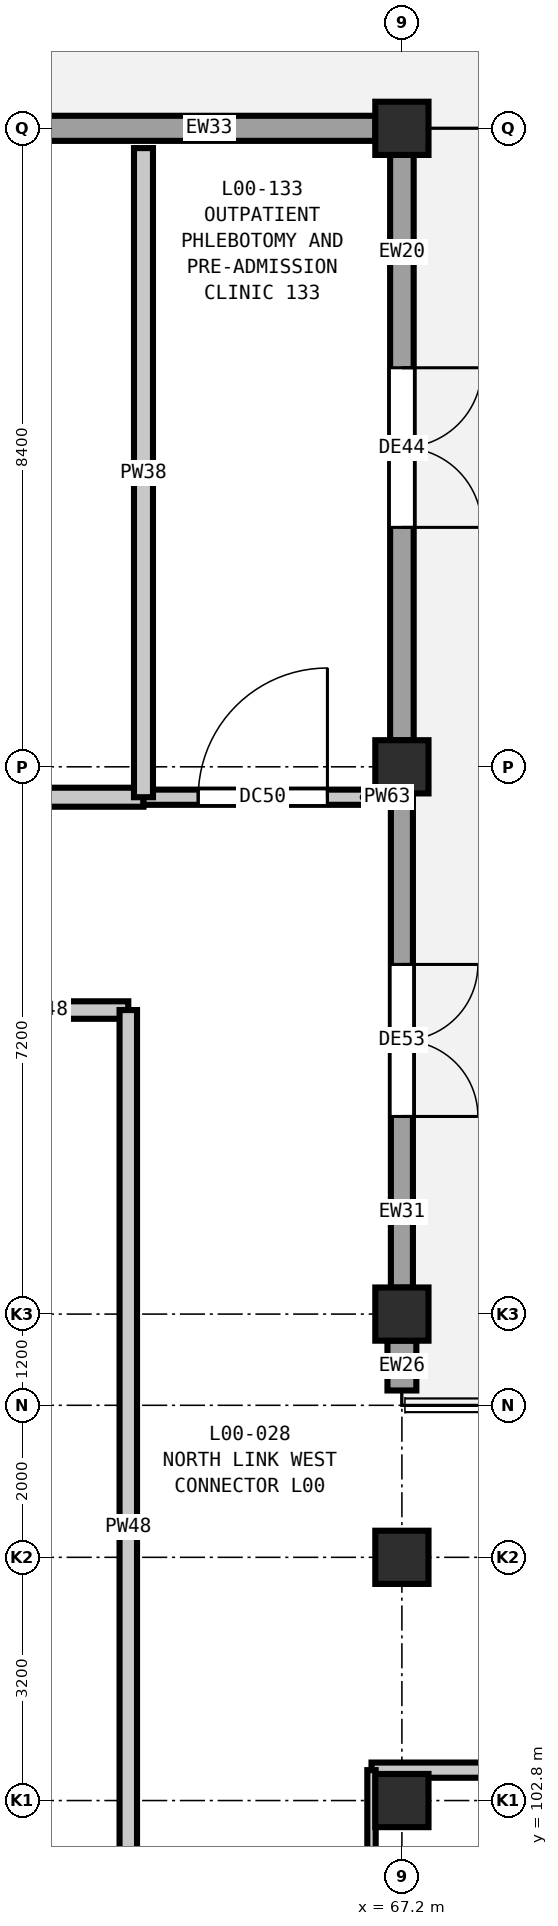
"""IFC4 building model, lengths in metres.
Left out: names, types, materials, properties, quantities, classifications, styles, units other than length and angle.
Written with IfcOpenShell. Run it as: python <this file> out.ifc"""

import sys

from ifc_helpers import new_model, si_unit, direction, frame, frame_2d, origin, origin_2d, place, context, subcontext, project, spatial, rectangle, extrude, element, fill, save


model = new_model("IFC4")
c1 = context("Model", 3, precision=1e-05, world=origin(), true_north=direction((0.0, 1.0)))
c2 = subcontext(c1, "Body", "Model", "MODEL_VIEW")
j1 = project(units=[si_unit("LENGTHUNIT", "METRE"), si_unit("PLANEANGLEUNIT", "RADIAN")], contexts=[c1])
p1 = place(None, origin())
s1 = spatial("IfcSite", under=j1, at=p1, CompositionType="ELEMENT")
p2 = place(p1, origin())
s2 = spatial("IfcBuilding", under=s1, at=p2, CompositionType="ELEMENT")
p3 = place(p2, origin())
s3 = spatial("IfcBuildingStorey", under=s2, at=p3, CompositionType="ELEMENT", Elevation=0.0)
for number, where, z_axis, x_axis in (
    (1, (67.2, 102.8, 0.0), (0.0, 0.0, 1.0), (1.0, 0.0, 0.0)),
    (2, (67.2, 106.0, 0.0), (0.0, 0.0, 1.0), (1.0, 0.0, 0.0)),
    (3, (67.2, 109.2, 0.0), (0.0, 0.0, 1.0), (1.0, 0.0, 0.0)),
    (4, (67.2, 116.4, 0.0), (0.0, 0.0, 1.0), (1.0, 0.0, 0.0)),
    (5, (67.2, 124.8, 0.0), (0.0, 0.0, 1.0), (1.0, 0.0, 0.0)),
):
    element("IfcColumn", number, at=place(p3, frame(where, z_axis=z_axis, x_axis=x_axis)), inside=s3, PredefinedType="COLUMN", context=c2, shape_type="SweptSolid", body=[
        extrude(rectangle(XDim=0.7, YDim=0.7, at=origin_2d()), origin(), (0.0, 0.0, 1.0), 5.4),
    ])
p4 = place(p3, frame((59.148, 124.8, 0.0), z_axis=(0.0, 0.0, 1.0), x_axis=(1.0, 0.0, 0.0)))
e6 = element("IfcWall", 6, at=p4, inside=s3, PredefinedType="SOLIDWALL", context=c2, shape_type="SweptSolid", body=[
    extrude(rectangle(XDim=7.704, YDim=0.33, at=frame_2d((3.852, 0.0))), origin(), (0.0, 0.0, 1.0), 4.68),
])
p5 = place(p4, frame((2.075, 0.0, 0.9)))
e7 = element("IfcOpeningElement", 7, at=p5, cuts=e6, PredefinedType="OPENING", context=c2, shape_type="SweptSolid", body=[
    extrude(rectangle(XDim=1.0, YDim=1.75, at=frame_2d((0.5, 0.875))), frame((0.0, 0.175, 0.0), z_axis=(0.0, -1.0, 0.0), x_axis=(1.0, 0.0, 0.0)), (0.0, 0.0, 1.0), 0.35),
])
p6 = place(p3, frame((67.2, 124.452, 0.0), z_axis=(0.0, 0.0, 1.0), x_axis=(0.0, -1.0, 0.0)))
e8 = element("IfcWall", 8, at=p6, inside=s3, PredefinedType="SOLIDWALL", context=c2, shape_type="SweptSolid", body=[
    extrude(rectangle(XDim=7.704, YDim=0.31, at=frame_2d((3.852, 0.0))), origin(), (0.0, 0.0, 1.0), 4.68),
])
p7 = place(p6, frame((2.802, 0.0, 0.0)))
e9 = element("IfcOpeningElement", 9, at=p7, cuts=e8, PredefinedType="OPENING", context=c2, shape_type="SweptSolid", body=[
    extrude(rectangle(XDim=2.1, YDim=2.35, at=frame_2d((1.05, 1.175))), frame((0.0, 0.165, 0.0), z_axis=(0.0, -1.0, 0.0), x_axis=(1.0, 0.0, 0.0)), (0.0, 0.0, 1.0), 0.33),
])
p8 = place(p3, frame((67.2, 116.052, 0.0), z_axis=(0.0, 0.0, 1.0), x_axis=(0.0, -1.0, 0.0)))
e10 = element("IfcWall", 10, at=p8, inside=s3, PredefinedType="SOLIDWALL", context=c2, shape_type="SweptSolid", body=[
    extrude(rectangle(XDim=6.504, YDim=0.29, at=frame_2d((3.252, 0.0))), origin(), (0.0, 0.0, 1.0), 4.68),
])
p9 = place(p8, frame((2.252, 0.0, 0.0)))
e11 = element("IfcOpeningElement", 11, at=p9, cuts=e10, PredefinedType="OPENING", context=c2, shape_type="SweptSolid", body=[
    extrude(rectangle(XDim=2.0, YDim=2.3, at=frame_2d((1.0, 1.15))), frame((0.0, 0.155, 0.0), z_axis=(0.0, -1.0, 0.0), x_axis=(1.0, 0.0, 0.0)), (0.0, 0.0, 1.0), 0.31),
])
p10 = place(p3, frame((67.2, 108.852, 0.0), z_axis=(0.0, 0.0, 1.0), x_axis=(0.0, -1.0, 0.0)))
e12 = element("IfcWall", 12, at=p10, inside=s3, PredefinedType="SOLIDWALL", context=c2, shape_type="SweptSolid", body=[
    extrude(rectangle(XDim=0.657, YDim=0.38, at=frame_2d((0.329, 0.0))), origin(), (0.0, 0.0, 1.0), 4.68),
])
p11 = place(p3, frame((66.8, 103.2, 0.0), z_axis=(0.0, 0.0, 1.0), x_axis=(1.0, 0.0, 0.0)))
e13 = element("IfcWall", 13, at=p11, inside=s3, PredefinedType="PARTITIONING", context=c2, shape_type="SweptSolid", body=[
    extrude(rectangle(XDim=6.4, YDim=0.2, at=frame_2d((3.2, 0.0))), origin(), (0.0, 0.0, 1.0), 5.04),
])
p12 = place(p11, frame((2.275, 0.0, 0.0)))
e14 = element("IfcOpeningElement", 14, at=p12, cuts=e13, PredefinedType="OPENING", context=c2, shape_type="SweptSolid", body=[
    extrude(rectangle(XDim=1.85, YDim=2.3, at=frame_2d((0.925, 1.15))), frame((0.0, 0.11, 0.0), z_axis=(0.0, -1.0, 0.0), x_axis=(1.0, 0.0, 0.0)), (0.0, 0.0, 1.0), 0.22),
])
p13 = place(p3, frame((57.0, 113.2, 0.0), z_axis=(0.0, 0.0, 1.0), x_axis=(1.0, 0.0, 0.0)))
e15 = element("IfcWall", 15, at=p13, inside=s3, PredefinedType="PARTITIONING", context=c2, shape_type="SweptSolid", body=[
    extrude(rectangle(XDim=6.6, YDim=0.23, at=frame_2d((3.3, 0.0))), origin(), (0.0, 0.0, 1.0), 5.04),
])
p14 = place(p13, frame((2.45, 0.0, 0.0)))
e16 = element("IfcOpeningElement", 16, at=p14, cuts=e15, PredefinedType="OPENING", context=c2, shape_type="SweptSolid", body=[
    extrude(rectangle(XDim=1.7, YDim=2.3, at=frame_2d((0.85, 1.15))), frame((0.0, 0.125, 0.0), z_axis=(0.0, -1.0, 0.0), x_axis=(1.0, 0.0, 0.0)), (0.0, 0.0, 1.0), 0.25),
])
p15 = place(p3, frame((58.2, 116.0, 0.0), z_axis=(0.0, 0.0, 1.0), x_axis=(1.0, 0.0, 0.0)))
e17 = element("IfcWall", 17, at=p15, inside=s3, PredefinedType="PARTITIONING", context=c2, shape_type="SweptSolid", body=[
    extrude(rectangle(XDim=5.6, YDim=0.25, at=frame_2d((2.8, 0.0))), origin(), (0.0, 0.0, 1.0), 5.04),
])
p16 = place(p15, frame((2.025, 0.0, 0.0)))
e18 = element("IfcOpeningElement", 18, at=p16, cuts=e17, PredefinedType="OPENING", context=c2, shape_type="SweptSolid", body=[
    extrude(rectangle(XDim=1.55, YDim=2.25, at=frame_2d((0.775, 1.125))), frame((0.0, 0.135, 0.0), z_axis=(0.0, -1.0, 0.0), x_axis=(1.0, 0.0, 0.0)), (0.0, 0.0, 1.0), 0.27),
])
p17 = place(p3, frame((63.8, 116.0, 0.0), z_axis=(0.0, 0.0, 1.0), x_axis=(1.0, 0.0, 0.0)))
e19 = element("IfcWall", 19, at=p17, inside=s3, PredefinedType="PARTITIONING", context=c2, shape_type="SweptSolid", body=[
    extrude(rectangle(XDim=3.14, YDim=0.2, at=frame_2d((1.57, 0.0))), origin(), (0.0, 0.0, 1.0), 5.04),
])
p18 = place(p17, frame((0.72, 0.0, 0.0)))
e20 = element("IfcOpeningElement", 20, at=p18, cuts=e19, PredefinedType="OPENING", context=c2, shape_type="SweptSolid", body=[
    extrude(rectangle(XDim=1.7, YDim=2.3, at=frame_2d((0.85, 1.15))), frame((0.0, 0.11, 0.0), z_axis=(0.0, -1.0, 0.0), x_axis=(1.0, 0.0, 0.0)), (0.0, 0.0, 1.0), 0.22),
])
p19 = place(p3, frame((63.6, 99.6, 0.0), z_axis=(0.0, 0.0, 1.0), x_axis=(0.0, 1.0, 0.0)))
e21 = element("IfcWall", 21, at=p19, inside=s3, PredefinedType="PARTITIONING", context=c2, shape_type="SweptSolid", body=[
    extrude(rectangle(XDim=13.6, YDim=0.23, at=frame_2d((6.8, 0.0))), origin(), (0.0, 0.0, 1.0), 5.04),
])
p20 = place(p3, frame((63.8, 116.0, 0.0), z_axis=(0.0, 0.0, 1.0), x_axis=(0.0, 1.0, 0.0)))
e22 = element("IfcWall", 22, at=p20, inside=s3, PredefinedType="PARTITIONING", context=c2, shape_type="SweptSolid", body=[
    extrude(rectangle(XDim=8.54, YDim=0.25, at=frame_2d((4.27, 0.0))), origin(), (0.0, 0.0, 1.0), 5.04),
])
p21 = place(p3, frame((66.8, 99.6, 0.0), z_axis=(0.0, 0.0, 1.0), x_axis=(0.0, 1.0, 0.0)))
e23 = element("IfcWall", 23, at=p21, inside=s3, PredefinedType="PARTITIONING", context=c2, shape_type="SweptSolid", body=[
    extrude(rectangle(XDim=3.6, YDim=0.11, at=frame_2d((1.8, 0.0))), origin(), (0.0, 0.0, 1.0), 5.04),
])
p22 = place(p7, origin())
e24 = element("IfcDoor", 24, at=p22, inside=s3, OperationType="DOUBLE_DOOR_SINGLE_SWING", PredefinedType="DOOR", context=c2, shape_type="SweptSolid", body=[
    extrude(rectangle(XDim=2.1, YDim=2.35, at=frame_2d((1.05, 1.175))), frame((0.0, 0.025, 0.0), z_axis=(0.0, -1.0, 0.0), x_axis=(1.0, 0.0, 0.0)), (0.0, 0.0, 1.0), 0.05),
])
fill(e9, e24)
p23 = place(p9, origin())
e25 = element("IfcDoor", 25, at=p23, inside=s3, OperationType="DOUBLE_DOOR_SINGLE_SWING", PredefinedType="DOOR", context=c2, shape_type="SweptSolid", body=[
    extrude(rectangle(XDim=2.0, YDim=2.3, at=frame_2d((1.0, 1.15))), frame((0.0, 0.025, 0.0), z_axis=(0.0, -1.0, 0.0), x_axis=(1.0, 0.0, 0.0)), (0.0, 0.0, 1.0), 0.05),
])
fill(e11, e25)
p24 = place(p18, origin())
e26 = element("IfcDoor", 26, at=p24, inside=s3, OperationType="SINGLE_SWING_RIGHT", PredefinedType="DOOR", context=c2, shape_type="SweptSolid", body=[
    extrude(rectangle(XDim=1.7, YDim=2.3, at=frame_2d((0.85, 1.15))), frame((0.0, 0.025, 0.0), z_axis=(0.0, -1.0, 0.0), x_axis=(1.0, 0.0, 0.0)), (0.0, 0.0, 1.0), 0.05),
])
fill(e20, e26)
save(model, sys.argv[1])
